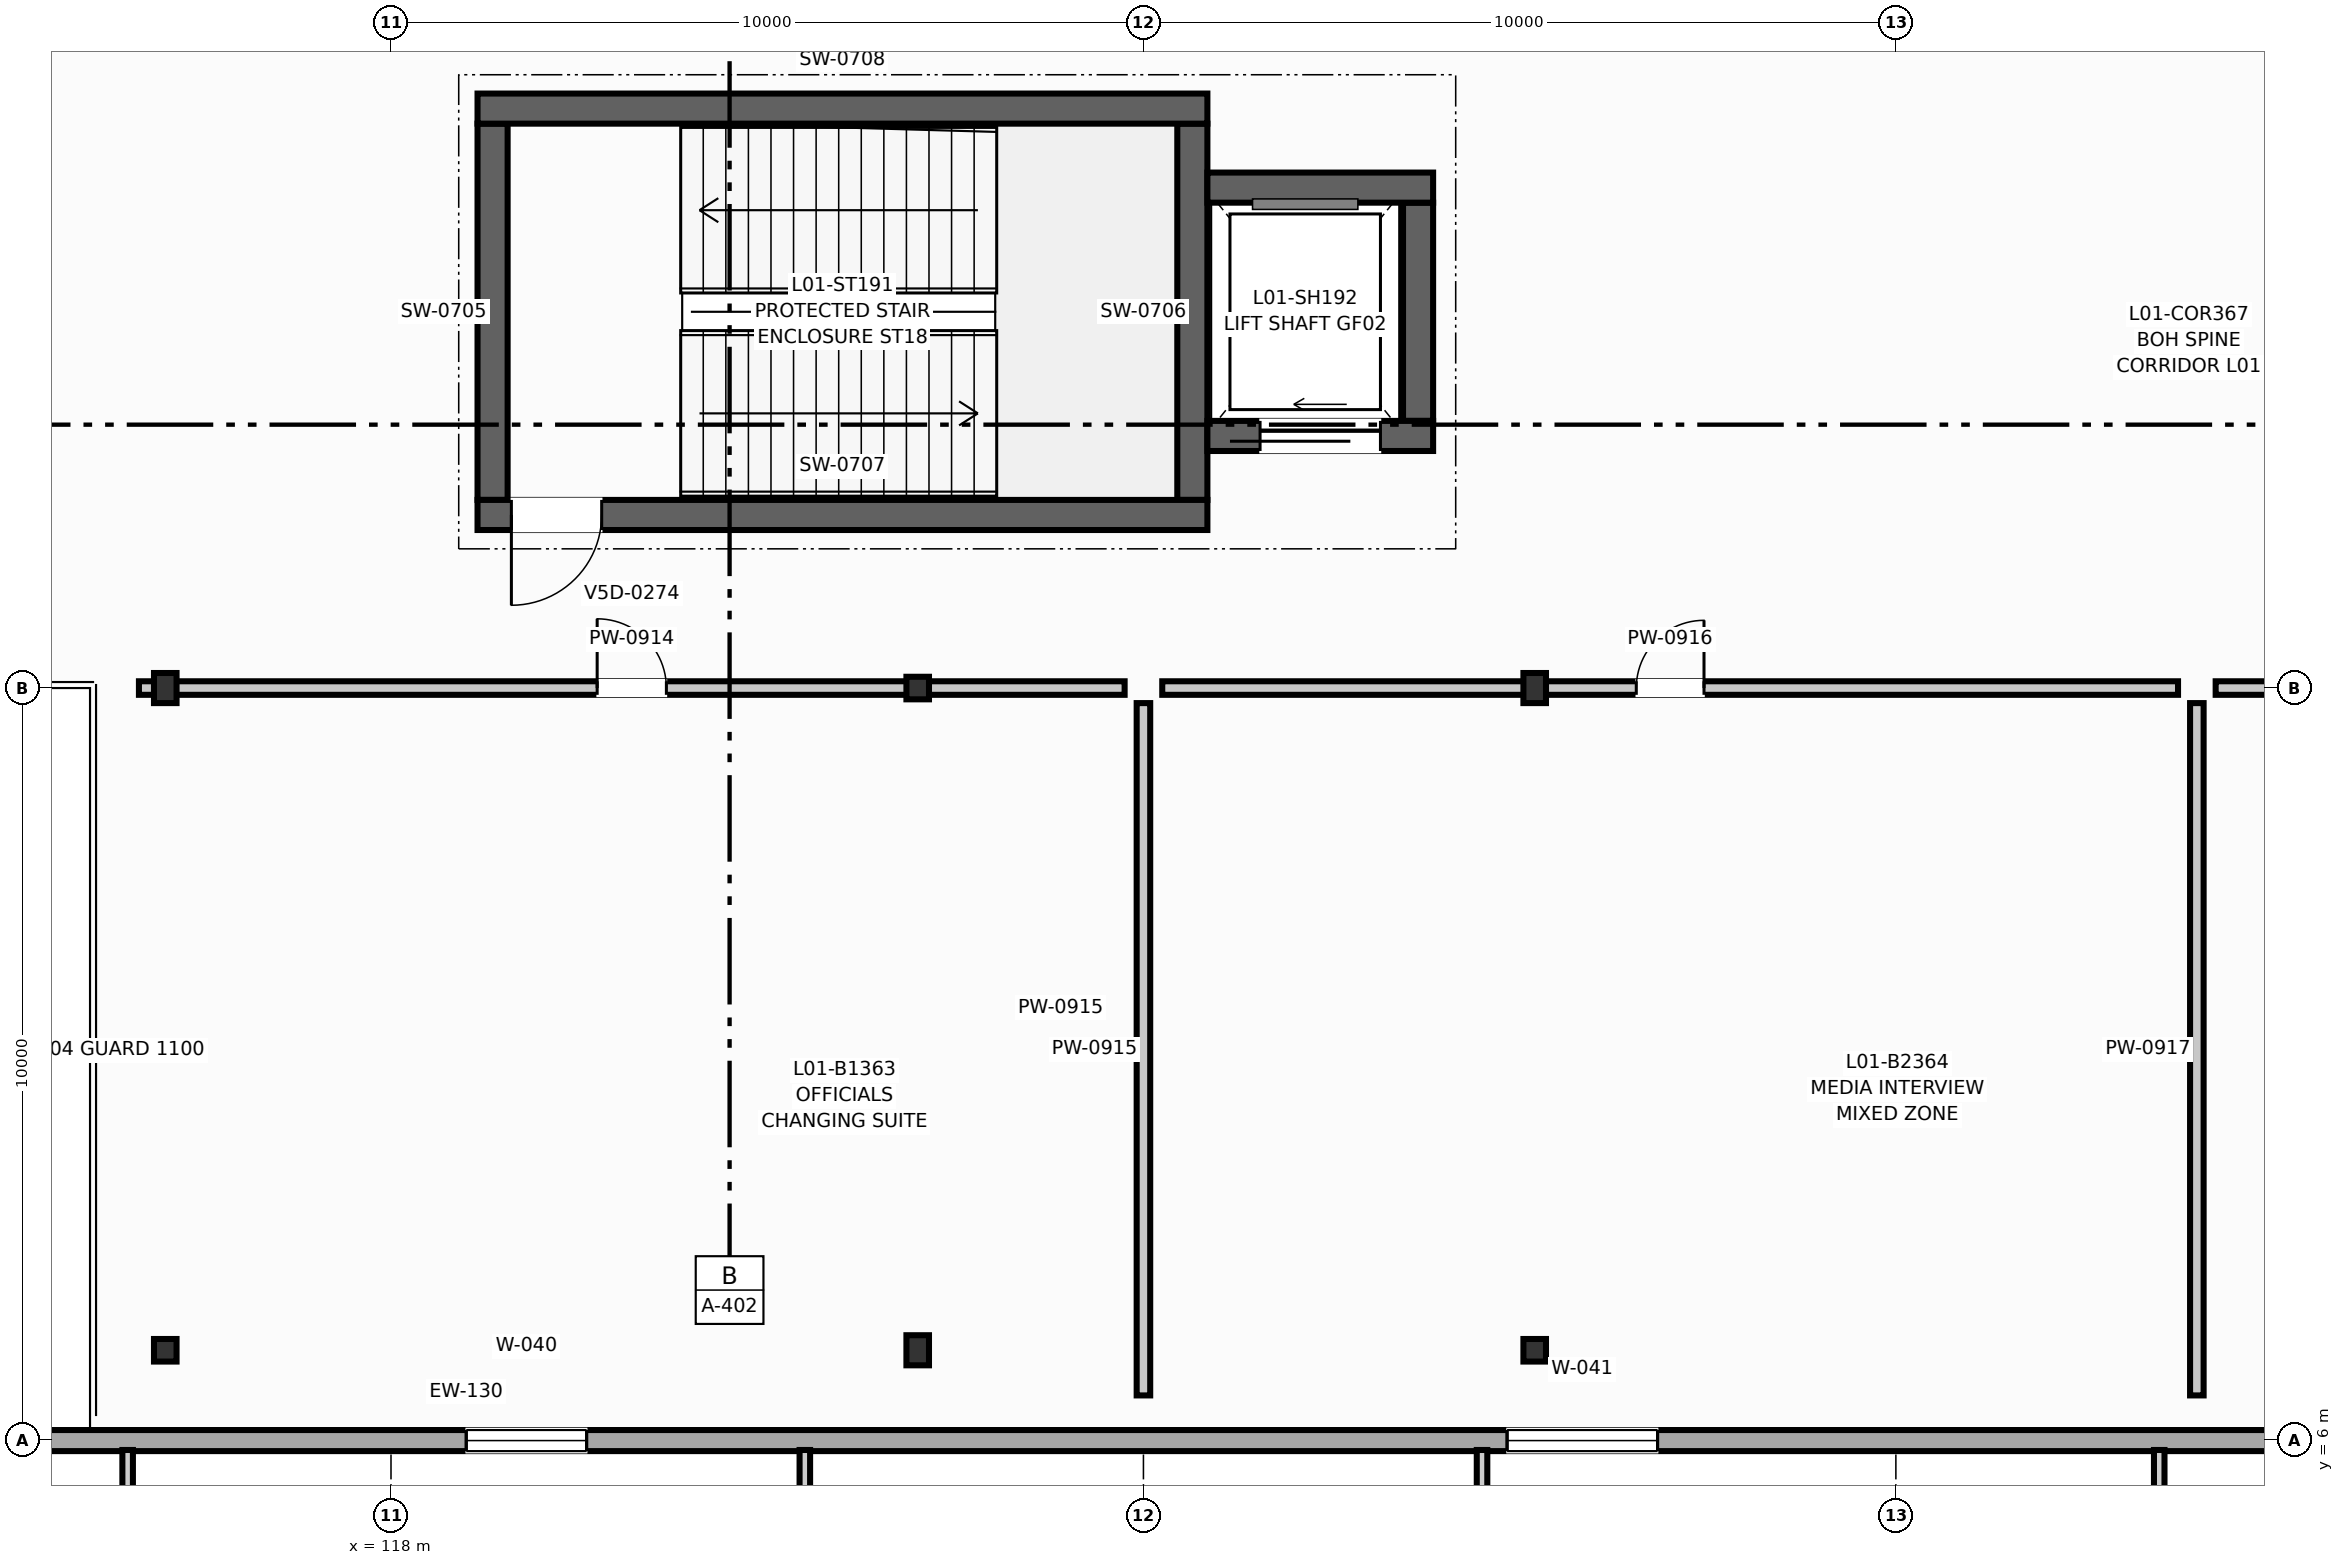
"""IFC4 building model, lengths in metres.
Left out: names, types, materials, properties, quantities, classifications, styles, units other than length and angle.
Written with IfcOpenShell. Run it as: python <this file> out.ifc"""

import sys

from ifc_helpers import new_model, si_unit, direction, frame, frame_2d, origin, origin_2d, place, context, subcontext, project, spatial, rectangle, i_section, extrude, element, fill, save


model = new_model("IFC4")
c1 = context("Model", 3, precision=1e-05, world=origin(), true_north=direction((0.0, 1.0)))
c2 = subcontext(c1, "Body", "Model", "MODEL_VIEW")
j1 = project(units=[si_unit("LENGTHUNIT", "METRE"), si_unit("PLANEANGLEUNIT", "RADIAN")], contexts=[c1])
p1 = place(None, origin())
s1 = spatial("IfcSite", under=j1, at=p1, CompositionType="ELEMENT")
p2 = place(p1, origin())
s2 = spatial("IfcBuilding", under=s1, at=p2, CompositionType="ELEMENT")
p3 = place(p2, frame((0.0, 0.0, 4.5)))
s3 = spatial("IfcBuildingStorey", under=s2, at=p3, CompositionType="ELEMENT", Elevation=4.5)
p4 = place(p3, frame((115.0, 7.2, 0.0), z_axis=(0.0, 0.0, 1.0), x_axis=(1.0, 0.0, 0.0)))
e1 = element("IfcColumn", 1, at=p4, inside=s3, PredefinedType="COLUMN", context=c2, shape_type="SweptSolid", body=[
    extrude(i_section(OverallWidth=0.3, OverallDepth=0.3, WebThickness=0.011, FlangeThickness=0.019, at=origin_2d()), origin(), (0.0, 0.0, 1.0), 4.5),
])
for number, where, z_axis, x_axis in (
    (2, (115.0, 16.0, 0.0), (0.0, 0.0, 1.0), (1.0, 0.0, 0.0)),
    (3, (125.0, 7.2, 0.0), (0.0, 0.0, 1.0), (1.0, 0.0, 0.0)),
):
    element("IfcColumn", number, at=place(p3, frame(where, z_axis=z_axis, x_axis=x_axis)), inside=s3, PredefinedType="COLUMN", context=c2, shape_type="SweptSolid", body=[
        extrude(i_section(OverallWidth=0.3, OverallDepth=0.4, WebThickness=0.013, FlangeThickness=0.024, at=origin_2d()), origin(), (0.0, 0.0, 1.0), 4.5),
    ])
for number, where, z_axis, x_axis in (
    (4, (125.0, 16.0, 0.0), (0.0, 0.0, 1.0), (1.0, 0.0, 0.0)),
    (5, (133.2, 7.2, 0.0), (0.0, 0.0, 1.0), (1.0, 0.0, 0.0)),
):
    element("IfcColumn", number, at=place(p3, frame(where, z_axis=z_axis, x_axis=x_axis)), inside=s3, PredefinedType="COLUMN", context=c2, shape_type="SweptSolid", body=[
        extrude(i_section(OverallWidth=0.3, OverallDepth=0.3, WebThickness=0.011, FlangeThickness=0.019, at=origin_2d()), origin(), (0.0, 0.0, 1.0), 4.5),
    ])
p5 = place(p3, frame((133.2, 16.0, 0.0), z_axis=(0.0, 0.0, 1.0), x_axis=(1.0, 0.0, 0.0)))
e6 = element("IfcColumn", 6, at=p5, inside=s3, PredefinedType="COLUMN", context=c2, shape_type="SweptSolid", body=[
    extrude(i_section(OverallWidth=0.3, OverallDepth=0.4, WebThickness=0.013, FlangeThickness=0.024, at=origin_2d()), origin(), (0.0, 0.0, 1.0), 4.5),
])
p6 = place(p3, frame((74.0, 6.0, 0.0), z_axis=(0.0, 0.0, 1.0), x_axis=(1.0, 0.0, 0.0)))
e7 = element("IfcWall", 7, at=p6, inside=s3, PredefinedType="SOLIDWALL", context=c2, shape_type="SweptSolid", body=[
    extrude(rectangle(XDim=90.0, YDim=0.28, at=frame_2d((45.0, 0.0))), origin(), (0.0, 0.0, 1.0), 3.5),
])
p7 = place(p6, frame((3.5, 0.0, 0.6)))
e8 = element("IfcOpeningElement", 8, at=p7, cuts=e7, PredefinedType="OPENING", context=c2, shape_type="SweptSolid", body=[
    extrude(rectangle(XDim=3.0, YDim=2.8, at=frame_2d((1.5, 1.4))), frame((0.0, 0.15, 0.0), z_axis=(0.0, -1.0, 0.0), x_axis=(1.0, 0.0, 0.0)), (0.0, 0.0, 1.0), 0.3),
])
p8 = place(p6, frame((17.333, 0.0, 0.85)))
e9 = element("IfcOpeningElement", 9, at=p8, cuts=e7, PredefinedType="OPENING", context=c2, shape_type="SweptSolid", body=[
    extrude(rectangle(XDim=1.5, YDim=2.2, at=frame_2d((0.75, 1.1))), frame((0.0, 0.15, 0.0), z_axis=(0.0, -1.0, 0.0), x_axis=(1.0, 0.0, 0.0)), (0.0, 0.0, 1.0), 0.3),
])
p9 = place(p6, frame((31.167, 0.0, 0.85)))
e10 = element("IfcOpeningElement", 10, at=p9, cuts=e7, PredefinedType="OPENING", context=c2, shape_type="SweptSolid", body=[
    extrude(rectangle(XDim=1.2, YDim=1.8, at=frame_2d((0.6, 0.9))), frame((0.0, 0.15, 0.0), z_axis=(0.0, -1.0, 0.0), x_axis=(1.0, 0.0, 0.0)), (0.0, 0.0, 1.0), 0.3),
])
p10 = place(p6, frame((45.0, 0.0, 0.85)))
e11 = element("IfcOpeningElement", 11, at=p10, cuts=e7, PredefinedType="OPENING", context=c2, shape_type="SweptSolid", body=[
    extrude(rectangle(XDim=1.6, YDim=1.8, at=frame_2d((0.8, 0.9))), frame((0.0, 0.15, 0.0), z_axis=(0.0, -1.0, 0.0), x_axis=(1.0, 0.0, 0.0)), (0.0, 0.0, 1.0), 0.3),
])
p11 = place(p6, frame((58.833, 0.0, 0.85)))
e12 = element("IfcOpeningElement", 12, at=p11, cuts=e7, PredefinedType="OPENING", context=c2, shape_type="SweptSolid", body=[
    extrude(rectangle(XDim=2.0, YDim=1.6, at=frame_2d((1.0, 0.8))), frame((0.0, 0.15, 0.0), z_axis=(0.0, -1.0, 0.0), x_axis=(1.0, 0.0, 0.0)), (0.0, 0.0, 1.0), 0.3),
])
p12 = place(p6, frame((72.667, 0.0, 0.85)))
e13 = element("IfcOpeningElement", 13, at=p12, cuts=e7, PredefinedType="OPENING", context=c2, shape_type="SweptSolid", body=[
    extrude(rectangle(XDim=2.6, YDim=1.5, at=frame_2d((1.3, 0.75))), frame((0.0, 0.15, 0.0), z_axis=(0.0, -1.0, 0.0), x_axis=(1.0, 0.0, 0.0)), (0.0, 0.0, 1.0), 0.3),
])
for number, where, z_axis, x_axis in (
    (14, (119.35, 18.5, 0.0), (0.0, 0.0, 1.0), (0.0, 1.0, 0.0)),
    (15, (128.65, 18.5, 0.0), (0.0, 0.0, 1.0), (0.0, 1.0, 0.0)),
):
    element("IfcWall", number, at=place(p3, frame(where, z_axis=z_axis, x_axis=x_axis)), inside=s3, PredefinedType="SHEAR", context=c2, shape_type="SweptSolid", body=[
        extrude(rectangle(XDim=5.0, YDim=0.4, at=frame_2d((2.5, 0.0))), origin(), (0.0, 0.0, 1.0), 4.25),
    ])
p13 = place(p3, frame((119.15, 18.3, 0.0), z_axis=(0.0, 0.0, 1.0), x_axis=(1.0, 0.0, 0.0)))
e16 = element("IfcWall", 16, at=p13, inside=s3, PredefinedType="SHEAR", context=c2, shape_type="SweptSolid", body=[
    extrude(rectangle(XDim=9.7, YDim=0.4, at=frame_2d((4.85, 0.0))), origin(), (0.0, 0.0, 1.0), 4.25),
])
p14 = place(p13, frame((0.45, 0.0, 0.0)))
e17 = element("IfcOpeningElement", 17, at=p14, cuts=e16, PredefinedType="OPENING", context=c2, shape_type="SweptSolid", body=[
    extrude(rectangle(XDim=1.2, YDim=2.2, at=frame_2d((0.6, 1.1))), frame((0.0, 0.21, 0.0), z_axis=(0.0, -1.0, 0.0), x_axis=(1.0, 0.0, 0.0)), (0.0, 0.0, 1.0), 0.42),
])
p15 = place(p3, frame((119.15, 23.7, 0.0), z_axis=(0.0, 0.0, 1.0), x_axis=(1.0, 0.0, 0.0)))
e18 = element("IfcWall", 18, at=p15, inside=s3, PredefinedType="SHEAR", context=c2, shape_type="SweptSolid", body=[
    extrude(rectangle(XDim=9.7, YDim=0.4, at=frame_2d((4.85, 0.0))), origin(), (0.0, 0.0, 1.0), 4.25),
])
p16 = place(p3, frame((131.65, 19.55, 0.0), z_axis=(0.0, 0.0, 1.0), x_axis=(0.0, 1.0, 0.0)))
e19 = element("IfcWall", 19, at=p16, inside=s3, PredefinedType="SHEAR", context=c2, shape_type="SweptSolid", body=[
    extrude(rectangle(XDim=2.9, YDim=0.4, at=frame_2d((1.45, 0.0))), origin(), (0.0, 0.0, 1.0), 4.25),
])
p17 = place(p3, frame((128.85, 19.35, 0.0), z_axis=(0.0, 0.0, 1.0), x_axis=(1.0, 0.0, 0.0)))
e20 = element("IfcWall", 20, at=p17, inside=s3, PredefinedType="SHEAR", context=c2, shape_type="SweptSolid", body=[
    extrude(rectangle(XDim=3.0, YDim=0.4, at=frame_2d((1.5, 0.0))), origin(), (0.0, 0.0, 1.0), 4.25),
])
p18 = place(p17, frame((0.7, 0.0, 0.0)))
e21 = element("IfcOpeningElement", 21, at=p18, cuts=e20, PredefinedType="OPENING", context=c2, shape_type="SweptSolid", body=[
    extrude(rectangle(XDim=1.6, YDim=2.35, at=frame_2d((0.8, 1.175))), frame((0.0, 0.21, 0.0), z_axis=(0.0, -1.0, 0.0), x_axis=(1.0, 0.0, 0.0)), (0.0, 0.0, 1.0), 0.42),
])
p19 = place(p3, frame((128.85, 22.65, 0.0), z_axis=(0.0, 0.0, 1.0), x_axis=(1.0, 0.0, 0.0)))
e22 = element("IfcWall", 22, at=p19, inside=s3, PredefinedType="SHEAR", context=c2, shape_type="SweptSolid", body=[
    extrude(rectangle(XDim=3.0, YDim=0.4, at=frame_2d((1.5, 0.0))), origin(), (0.0, 0.0, 1.0), 4.25),
])
p20 = place(p3, frame((114.65, 16.0, 0.0), z_axis=(0.0, 0.0, 1.0), x_axis=(1.0, 0.0, 0.0)))
e23 = element("IfcWall", 23, at=p20, inside=s3, PredefinedType="PARTITIONING", context=c2, shape_type="SweptSolid", body=[
    extrude(rectangle(XDim=13.1, YDim=0.18, at=frame_2d((6.55, 0.0))), origin(), (0.0, 0.0, 1.0), 3.22),
])
p21 = place(p20, frame((6.09, 0.0, 0.0)))
e24 = element("IfcOpeningElement", 24, at=p21, cuts=e23, PredefinedType="OPENING", context=c2, shape_type="SweptSolid", body=[
    extrude(rectangle(XDim=0.92, YDim=2.1, at=frame_2d((0.46, 1.05))), frame((0.0, 0.1, 0.0), z_axis=(0.0, -1.0, 0.0), x_axis=(1.0, 0.0, 0.0)), (0.0, 0.0, 1.0), 0.2),
])
p22 = place(p3, frame((128.0, 6.6, 0.0), z_axis=(0.0, 0.0, 1.0), x_axis=(0.0, 1.0, 0.0)))
e25 = element("IfcWall", 25, at=p22, inside=s3, PredefinedType="PARTITIONING", context=c2, shape_type="SweptSolid", body=[
    extrude(rectangle(XDim=9.2, YDim=0.18, at=frame_2d((4.6, 0.0))), origin(), (0.0, 0.0, 1.0), 3.22),
])
p23 = place(p3, frame((128.25, 16.0, 0.0), z_axis=(0.0, 0.0, 1.0), x_axis=(1.0, 0.0, 0.0)))
e26 = element("IfcWall", 26, at=p23, inside=s3, PredefinedType="PARTITIONING", context=c2, shape_type="SweptSolid", body=[
    extrude(rectangle(XDim=13.5, YDim=0.18, at=frame_2d((6.75, 0.0))), origin(), (0.0, 0.0, 1.0), 3.22),
])
p24 = place(p23, frame((6.3, 0.0, 0.0)))
e27 = element("IfcOpeningElement", 27, at=p24, cuts=e26, PredefinedType="OPENING", context=c2, shape_type="SweptSolid", body=[
    extrude(rectangle(XDim=0.9, YDim=2.1, at=frame_2d((0.45, 1.05))), frame((0.0, 0.1, 0.0), z_axis=(0.0, -1.0, 0.0), x_axis=(1.0, 0.0, 0.0)), (0.0, 0.0, 1.0), 0.2),
])
p25 = place(p3, frame((142.0, 6.6, 0.0), z_axis=(0.0, 0.0, 1.0), x_axis=(0.0, 1.0, 0.0)))
e28 = element("IfcWall", 28, at=p25, inside=s3, PredefinedType="PARTITIONING", context=c2, shape_type="SweptSolid", body=[
    extrude(rectangle(XDim=9.2, YDim=0.18, at=frame_2d((4.6, 0.0))), origin(), (0.0, 0.0, 1.0), 3.22),
])
p26 = place(p3, frame((142.25, 16.0, 0.0), z_axis=(0.0, 0.0, 1.0), x_axis=(1.0, 0.0, 0.0)))
e29 = element("IfcWall", 29, at=p26, inside=s3, PredefinedType="PARTITIONING", context=c2, shape_type="SweptSolid", body=[
    extrude(rectangle(XDim=11.5, YDim=0.18, at=frame_2d((5.75, 0.0))), origin(), (0.0, 0.0, 1.0), 3.22),
])
p27 = place(p26, frame((5.31, 0.0, 0.0)))
e30 = element("IfcOpeningElement", 30, at=p27, cuts=e29, PredefinedType="OPENING", context=c2, shape_type="SweptSolid", body=[
    extrude(rectangle(XDim=0.88, YDim=2.08, at=frame_2d((0.44, 1.04))), frame((0.0, 0.1, 0.0), z_axis=(0.0, -1.0, 0.0), x_axis=(1.0, 0.0, 0.0)), (0.0, 0.0, 1.0), 0.2),
])
p28 = place(p10, origin())
e31 = element("IfcWindow", 31, at=p28, inside=s3, PartitioningType="SINGLE_PANEL", PredefinedType="WINDOW", context=c2, shape_type="SweptSolid", body=[
    extrude(rectangle(XDim=1.6, YDim=1.8, at=frame_2d((0.8, 0.9))), frame((0.0, 0.03, 0.0), z_axis=(0.0, -1.0, 0.0), x_axis=(1.0, 0.0, 0.0)), (0.0, 0.0, 1.0), 0.06),
])
fill(e11, e31)
p29 = place(p11, origin())
e32 = element("IfcWindow", 32, at=p29, inside=s3, PartitioningType="SINGLE_PANEL", PredefinedType="WINDOW", context=c2, shape_type="SweptSolid", body=[
    extrude(rectangle(XDim=2.0, YDim=1.6, at=frame_2d((1.0, 0.8))), frame((0.0, 0.03, 0.0), z_axis=(0.0, -1.0, 0.0), x_axis=(1.0, 0.0, 0.0)), (0.0, 0.0, 1.0), 0.06),
])
fill(e12, e32)
p30 = place(p14, frame((1.2, 0.0, 0.0), z_axis=(0.0, 0.0, 1.0), x_axis=(-1.0, 0.0, 0.0)))
e33 = element("IfcDoor", 33, at=p30, inside=s3, OperationType="SINGLE_SWING_LEFT", PredefinedType="DOOR", context=c2, shape_type="SweptSolid", body=[
    extrude(rectangle(XDim=1.2, YDim=2.2, at=frame_2d((0.6, 1.1))), frame((0.0, 0.025, 0.0), z_axis=(0.0, -1.0, 0.0), x_axis=(1.0, 0.0, 0.0)), (0.0, 0.0, 1.0), 0.05),
])
fill(e17, e33)
p31 = place(p18, origin())
e34 = element("IfcDoor", 34, at=p31, inside=s3, OperationType="SLIDING_TO_LEFT", PredefinedType="DOOR", context=c2, shape_type="SweptSolid", body=[
    extrude(rectangle(XDim=1.6, YDim=2.35, at=frame_2d((0.8, 1.175))), frame((0.0, 0.025, 0.0), z_axis=(0.0, -1.0, 0.0), x_axis=(1.0, 0.0, 0.0)), (0.0, 0.0, 1.0), 0.05),
])
fill(e21, e34)
p32 = place(p21, origin())
e35 = element("IfcDoor", 35, at=p32, inside=s3, OperationType="SINGLE_SWING_LEFT", PredefinedType="DOOR", context=c2, shape_type="SweptSolid", body=[
    extrude(rectangle(XDim=0.92, YDim=2.1, at=frame_2d((0.46, 1.05))), frame((0.0, 0.025, 0.0), z_axis=(0.0, -1.0, 0.0), x_axis=(1.0, 0.0, 0.0)), (0.0, 0.0, 1.0), 0.05),
])
fill(e24, e35)
p33 = place(p24, origin())
e36 = element("IfcDoor", 36, at=p33, inside=s3, OperationType="SINGLE_SWING_RIGHT", PredefinedType="DOOR", context=c2, shape_type="SweptSolid", body=[
    extrude(rectangle(XDim=0.9, YDim=2.1, at=frame_2d((0.45, 1.05))), frame((0.0, 0.025, 0.0), z_axis=(0.0, -1.0, 0.0), x_axis=(1.0, 0.0, 0.0)), (0.0, 0.0, 1.0), 0.05),
])
fill(e27, e36)
save(model, sys.argv[1])
